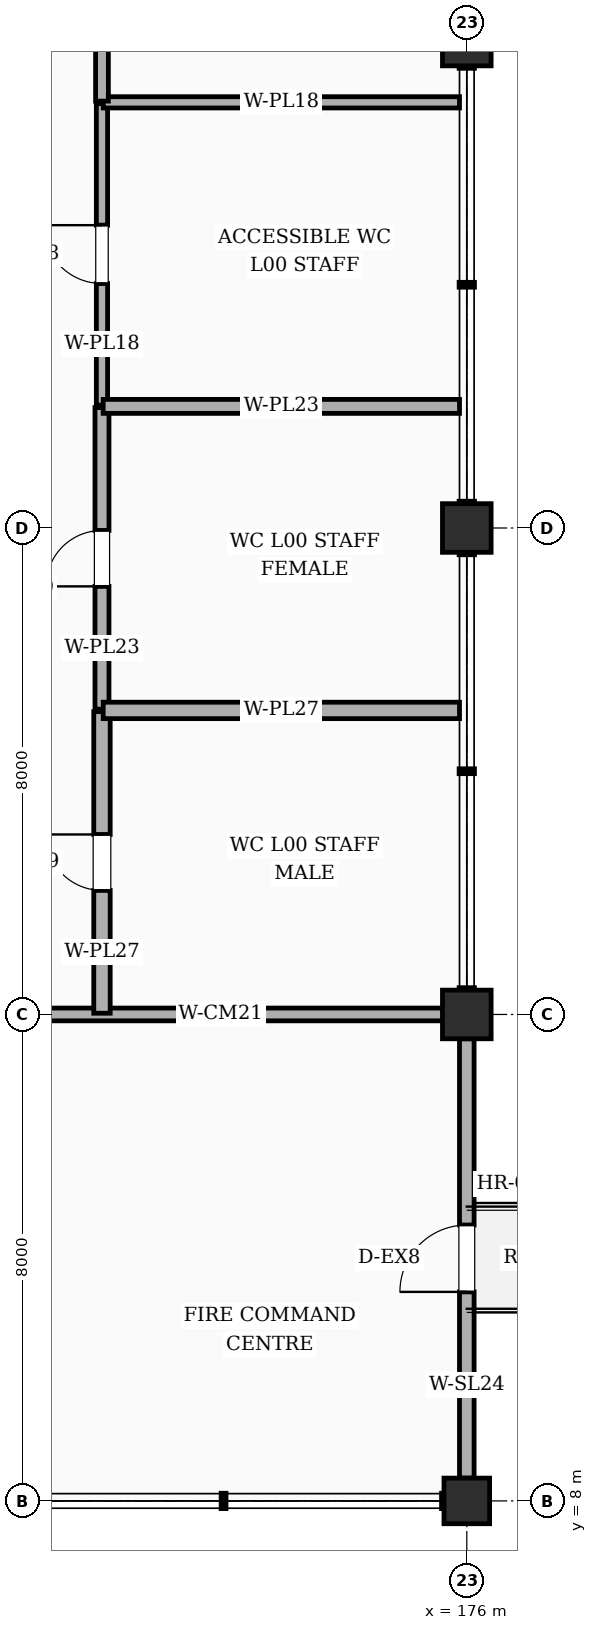
"""IFC4 building model, lengths in metres.
Left out: names, types, materials, properties, quantities, classifications, styles, units other than length and angle.
Written with IfcOpenShell. Run it as: python <this file> out.ifc"""

import sys

from ifc_helpers import new_model, si_unit, direction, frame, frame_2d, origin, origin_2d, place, context, subcontext, project, spatial, rectangle, extrude, element, fill, save


model = new_model("IFC4")
c1 = context("Model", 3, precision=1e-05, world=origin(), true_north=direction((0.0, 1.0)))
c2 = subcontext(c1, "Body", "Model", "MODEL_VIEW")
j1 = project(units=[si_unit("LENGTHUNIT", "METRE"), si_unit("PLANEANGLEUNIT", "RADIAN")], contexts=[c1])
p1 = place(None, origin())
s1 = spatial("IfcSite", under=j1, at=p1, CompositionType="ELEMENT")
p2 = place(p1, origin())
s2 = spatial("IfcBuilding", under=s1, at=p2, CompositionType="ELEMENT")
p3 = place(p2, origin())
s3 = spatial("IfcBuildingStorey", under=s2, at=p3, CompositionType="ELEMENT", Elevation=0.0)
p4 = place(p3, frame((176.0, 8.0, 0.0), z_axis=(0.0, 0.0, 1.0), x_axis=(1.0, 0.0, 0.0)))
e1 = element("IfcColumn", 1, at=p4, inside=s3, PredefinedType="COLUMN", context=c2, shape_type="SweptSolid", body=[
    extrude(rectangle(XDim=0.75, YDim=0.75, at=origin_2d()), origin(), (0.0, 0.0, 1.0), 5.4),
])
for number, where, z_axis, x_axis in (
    (2, (176.0, 16.0, 0.0), (0.0, 0.0, 1.0), (1.0, 0.0, 0.0)),
    (3, (176.0, 24.0, 0.0), (0.0, 0.0, 1.0), (1.0, 0.0, 0.0)),
    (4, (176.0, 32.0, 0.0), (0.0, 0.0, 1.0), (1.0, 0.0, 0.0)),
):
    element("IfcColumn", number, at=place(p3, frame(where, z_axis=z_axis, x_axis=x_axis)), inside=s3, PredefinedType="COLUMN", context=c2, shape_type="SweptSolid", body=[
        extrude(rectangle(XDim=0.8, YDim=0.8, at=origin_2d()), origin(), (0.0, 0.0, 1.0), 5.4),
    ])
p5 = place(p3, frame((176.0, 8.375, 0.0), z_axis=(0.0, 0.0, 1.0), x_axis=(0.0, 1.0, 0.0)))
e5 = element("IfcWall", 5, at=p5, inside=s3, PredefinedType="SOLIDWALL", context=c2, shape_type="SweptSolid", body=[
    extrude(rectangle(XDim=7.225, YDim=0.24, at=frame_2d((3.613, 0.0))), origin(), (0.0, 0.0, 1.0), 4.42),
])
p6 = place(p5, frame((3.062, 0.0, 0.0)))
e6 = element("IfcOpeningElement", 6, at=p6, cuts=e5, PredefinedType="OPENING", context=c2, shape_type="SweptSolid", body=[
    extrude(rectangle(XDim=1.1, YDim=2.2, at=frame_2d((0.55, 1.1))), frame((0.0, 0.13, 0.0), z_axis=(0.0, -1.0, 0.0), x_axis=(1.0, 0.0, 0.0)), (0.0, 0.0, 1.0), 0.26),
])
p7 = place(p3, frame((168.02, 16.0, 0.0), z_axis=(0.0, 0.0, 1.0), x_axis=(1.0, 0.0, 0.0)))
e7 = element("IfcWall", 7, at=p7, inside=s3, PredefinedType="SOLIDWALL", context=c2, shape_type="SweptSolid", body=[
    extrude(rectangle(XDim=7.86, YDim=0.21, at=frame_2d((3.93, 0.0))), origin(), (0.0, 0.0, 1.0), 4.27),
])
p8 = place(p3, frame((170.0, 16.02, 0.0), z_axis=(0.0, 0.0, 1.0), x_axis=(0.0, 1.0, 0.0)))
e8 = element("IfcWall", 8, at=p8, inside=s3, PredefinedType="PLUMBINGWALL", context=c2, shape_type="SweptSolid", body=[
    extrude(rectangle(XDim=4.96, YDim=0.27, at=frame_2d((2.48, 0.0))), origin(), (0.0, 0.0, 1.0), 4.27),
])
p9 = place(p8, frame((2.02, 0.0, 0.0)))
e9 = element("IfcOpeningElement", 9, at=p9, cuts=e8, PredefinedType="OPENING", context=c2, shape_type="SweptSolid", body=[
    extrude(rectangle(XDim=0.92, YDim=2.1, at=frame_2d((0.46, 1.05))), frame((0.0, 0.145, 0.0), z_axis=(0.0, -1.0, 0.0), x_axis=(1.0, 0.0, 0.0)), (0.0, 0.0, 1.0), 0.29),
])
p10 = place(p3, frame((170.0, 21.02, 0.0), z_axis=(0.0, 0.0, 1.0), x_axis=(0.0, 1.0, 0.0)))
e10 = element("IfcWall", 10, at=p10, inside=s3, PredefinedType="PLUMBINGWALL", context=c2, shape_type="SweptSolid", body=[
    extrude(rectangle(XDim=4.96, YDim=0.23, at=frame_2d((2.48, 0.0))), origin(), (0.0, 0.0, 1.0), 4.27),
])
p11 = place(p10, frame((2.02, 0.0, 0.0)))
e11 = element("IfcOpeningElement", 11, at=p11, cuts=e10, PredefinedType="OPENING", context=c2, shape_type="SweptSolid", body=[
    extrude(rectangle(XDim=0.92, YDim=2.1, at=frame_2d((0.46, 1.05))), frame((0.0, 0.125, 0.0), z_axis=(0.0, -1.0, 0.0), x_axis=(1.0, 0.0, 0.0)), (0.0, 0.0, 1.0), 0.25),
])
p12 = place(p3, frame((170.0, 26.02, 0.0), z_axis=(0.0, 0.0, 1.0), x_axis=(0.0, 1.0, 0.0)))
e12 = element("IfcWall", 12, at=p12, inside=s3, PredefinedType="PLUMBINGWALL", context=c2, shape_type="SweptSolid", body=[
    extrude(rectangle(XDim=4.96, YDim=0.185, at=frame_2d((2.48, 0.0))), origin(), (0.0, 0.0, 1.0), 5.1),
])
p13 = place(p12, frame((2.0, 0.0, 0.0)))
e13 = element("IfcOpeningElement", 13, at=p13, cuts=e12, PredefinedType="OPENING", context=c2, shape_type="SweptSolid", body=[
    extrude(rectangle(XDim=0.96, YDim=2.1, at=frame_2d((0.48, 1.05))), frame((0.0, 0.103, 0.0), z_axis=(0.0, -1.0, 0.0), x_axis=(1.0, 0.0, 0.0)), (0.0, 0.0, 1.0), 0.205),
])
p14 = place(p3, frame((170.02, 21.0, 0.0), z_axis=(0.0, 0.0, 1.0), x_axis=(1.0, 0.0, 0.0)))
e14 = element("IfcWall", 14, at=p14, inside=s3, PredefinedType="PLUMBINGWALL", context=c2, shape_type="SweptSolid", body=[
    extrude(rectangle(XDim=5.86, YDim=0.27, at=frame_2d((2.93, 0.0))), origin(), (0.0, 0.0, 1.0), 4.42),
])
p15 = place(p3, frame((170.02, 26.0, 0.0), z_axis=(0.0, 0.0, 1.0), x_axis=(1.0, 0.0, 0.0)))
e15 = element("IfcWall", 15, at=p15, inside=s3, PredefinedType="PLUMBINGWALL", context=c2, shape_type="SweptSolid", body=[
    extrude(rectangle(XDim=5.86, YDim=0.23, at=frame_2d((2.93, 0.0))), origin(), (0.0, 0.0, 1.0), 4.42),
])
p16 = place(p3, frame((170.02, 31.0, 0.0), z_axis=(0.0, 0.0, 1.0), x_axis=(1.0, 0.0, 0.0)))
e16 = element("IfcWall", 16, at=p16, inside=s3, PredefinedType="PLUMBINGWALL", context=c2, shape_type="SweptSolid", body=[
    extrude(rectangle(XDim=5.86, YDim=0.185, at=frame_2d((2.93, 0.0))), origin(), (0.0, 0.0, 1.0), 4.42),
])
p17 = place(p3, frame((170.0, 31.02, 0.0), z_axis=(0.0, 0.0, 1.0), x_axis=(0.0, 1.0, 0.0)))
e17 = element("IfcWall", 17, at=p17, inside=s3, PredefinedType="SOLIDWALL", context=c2, shape_type="SweptSolid", body=[
    extrude(rectangle(XDim=32.86, YDim=0.21, at=frame_2d((16.43, 0.0))), origin(), (0.0, 0.0, 1.0), 4.27),
])
p18 = place(p17, frame((15.83, 0.0, 0.0)))
e18 = element("IfcOpeningElement", 18, at=p18, cuts=e17, PredefinedType="OPENING", context=c2, shape_type="SweptSolid", body=[
    extrude(rectangle(XDim=1.2, YDim=2.15, at=frame_2d((0.6, 1.075))), frame((0.0, 0.115, 0.0), z_axis=(0.0, -1.0, 0.0), x_axis=(1.0, 0.0, 0.0)), (0.0, 0.0, 1.0), 0.23),
])
p19 = place(p6, frame((1.1, 0.0, 0.0), z_axis=(0.0, 0.0, 1.0), x_axis=(-1.0, 0.0, 0.0)))
e19 = element("IfcDoor", 19, at=p19, inside=s3, OperationType="SINGLE_SWING_LEFT", PredefinedType="DOOR", context=c2, shape_type="SweptSolid", body=[
    extrude(rectangle(XDim=1.1, YDim=2.2, at=frame_2d((-0.55, 1.1))), frame((0.0, -0.025, 0.0), z_axis=(0.0, 1.0, 0.0), x_axis=(-1.0, 0.0, 0.0)), (0.0, 0.0, 1.0), 0.05),
])
fill(e6, e19)
p20 = place(p9, origin())
e20 = element("IfcDoor", 20, at=p20, inside=s3, OperationType="SINGLE_SWING_RIGHT", PredefinedType="DOOR", context=c2, shape_type="SweptSolid", body=[
    extrude(rectangle(XDim=0.92, YDim=2.1, at=frame_2d((0.46, 1.05))), frame((0.0, 0.025, 0.0), z_axis=(0.0, -1.0, 0.0), x_axis=(1.0, 0.0, 0.0)), (0.0, 0.0, 1.0), 0.05),
])
fill(e9, e20)
p21 = place(p11, origin())
e21 = element("IfcDoor", 21, at=p21, inside=s3, OperationType="SINGLE_SWING_LEFT", PredefinedType="DOOR", context=c2, shape_type="SweptSolid", body=[
    extrude(rectangle(XDim=0.92, YDim=2.1, at=frame_2d((0.46, 1.05))), frame((0.0, 0.025, 0.0), z_axis=(0.0, -1.0, 0.0), x_axis=(1.0, 0.0, 0.0)), (0.0, 0.0, 1.0), 0.05),
])
fill(e11, e21)
p22 = place(p13, origin())
e22 = element("IfcDoor", 22, at=p22, inside=s3, OperationType="SINGLE_SWING_RIGHT", PredefinedType="DOOR", context=c2, shape_type="SweptSolid", body=[
    extrude(rectangle(XDim=0.96, YDim=2.1, at=frame_2d((0.48, 1.05))), frame((0.0, 0.025, 0.0), z_axis=(0.0, -1.0, 0.0), x_axis=(1.0, 0.0, 0.0)), (0.0, 0.0, 1.0), 0.05),
])
fill(e13, e22)
save(model, sys.argv[1])
